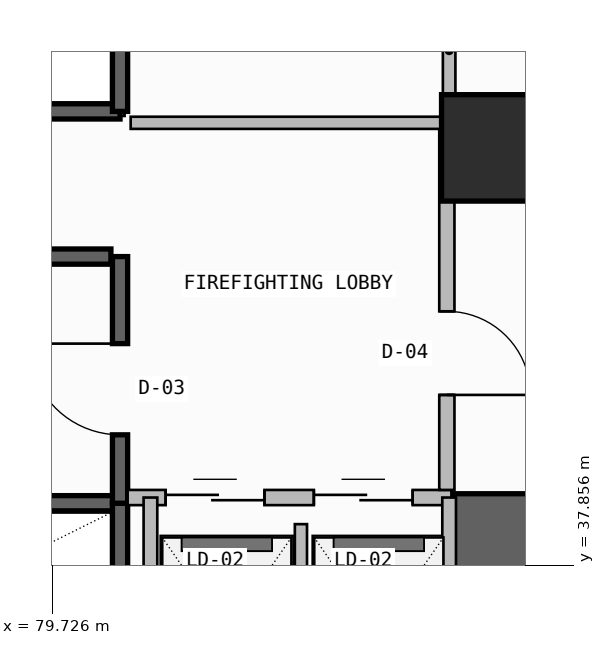
"""IFC4 building model, lengths in metres.
Left out: names, types, materials, properties, quantities, classifications, styles, units other than length and angle.
Written with IfcOpenShell. Run it as: python <this file> out.ifc"""

import sys

from ifc_helpers import new_model, si_unit, direction, frame, frame_2d, origin, origin_2d, place, context, subcontext, project, spatial, rectangle, extrude, element, fill, save


model = new_model("IFC4")
c1 = context("Model", 3, precision=1e-05, world=origin(), true_north=direction((0.0, 1.0)))
c2 = subcontext(c1, "Body", "Model", "MODEL_VIEW")
j1 = project(units=[si_unit("LENGTHUNIT", "METRE"), si_unit("PLANEANGLEUNIT", "RADIAN")], contexts=[c1])
p1 = place(None, origin())
s1 = spatial("IfcSite", under=j1, at=p1, CompositionType="ELEMENT")
p2 = place(p1, origin())
s2 = spatial("IfcBuilding", under=s1, at=p2, CompositionType="ELEMENT")
p3 = place(p2, frame((0.0, 0.0, 70.5)))
s3 = spatial("IfcBuildingStorey", under=s2, at=p3, CompositionType="ELEMENT", Elevation=70.5)
p4 = place(p3, frame((85.55, 35.5, -0.26), z_axis=(0.0, 0.0, 1.0), x_axis=(0.0, 1.0, 0.0)))
e1 = element("IfcWall", 1, at=p4, inside=s3, PredefinedType="SHEAR", context=c2, shape_type="SweptSolid", body=[
    extrude(rectangle(XDim=3.3, YDim=1.1, at=frame_2d((1.65, 0.0))), origin(), (0.0, 0.0, 1.0), 3.6),
])
p5 = place(p3, frame((85.55, 43.35, 0.0), z_axis=(0.0, 0.0, 1.0), x_axis=(1.0, 0.0, 0.0)))
e2 = element("IfcColumn", 2, at=p5, inside=s3, PredefinedType="COLUMN", context=c2, shape_type="SweptSolid", body=[
    extrude(rectangle(XDim=1.4, YDim=1.4, at=origin_2d()), origin(), (0.0, 0.0, 1.0), 3.6),
])
p6 = place(p3, frame((72.92, 38.675, -0.26), z_axis=(0.0, 0.0, 1.0), x_axis=(1.0, 0.0, 0.0)))
e3 = element("IfcWall", 3, at=p6, inside=s3, PredefinedType="SOLIDWALL", context=c2, shape_type="SweptSolid", body=[
    extrude(rectangle(XDim=7.7, YDim=0.2, at=frame_2d((3.85, 0.0))), origin(), (0.0, 0.0, 1.0), 3.6),
])
p7 = place(p3, frame((80.62, 35.52, -0.26), z_axis=(0.0, 0.0, 1.0), x_axis=(0.0, 1.0, 0.0)))
e4 = element("IfcWall", 4, at=p7, inside=s3, PredefinedType="SOLIDWALL", context=c2, shape_type="SweptSolid", body=[
    extrude(rectangle(XDim=3.155, YDim=0.2, at=frame_2d((1.578, 0.0))), origin(), (0.0, 0.0, 1.0), 3.6),
])
p8 = place(p3, frame((80.62, 38.675, -0.26), z_axis=(0.0, 0.0, 1.0), x_axis=(0.0, 1.0, 0.0)))
e5 = element("IfcWall", 5, at=p8, inside=s3, PredefinedType="SOLIDWALL", context=c2, shape_type="SweptSolid", body=[
    extrude(rectangle(XDim=3.245, YDim=0.2, at=frame_2d((1.623, 0.0))), origin(), (0.0, 0.0, 1.0), 3.6),
])
p9 = place(p8, frame((0.9, 0.0, 0.26)))
e6 = element("IfcOpeningElement", 6, at=p9, cuts=e5, PredefinedType="OPENING", context=c2, shape_type="SweptSolid", body=[
    extrude(rectangle(XDim=1.2, YDim=2.2, at=frame_2d((0.6, 1.1))), frame((0.0, 0.11, 0.0), z_axis=(0.0, -1.0, 0.0), x_axis=(1.0, 0.0, 0.0)), (0.0, 0.0, 1.0), 0.22),
])
p10 = place(p3, frame((80.72, 38.75, 0.0), z_axis=(0.0, 0.0, 1.0), x_axis=(1.0, 0.0, 0.0)))
e7 = element("IfcWall", 7, at=p10, inside=s3, PredefinedType="SOLIDWALL", context=c2, shape_type="SweptSolid", body=[
    extrude(rectangle(XDim=4.26, YDim=0.2, at=frame_2d((2.13, 0.0))), origin(), (0.0, 0.0, 1.0), 3.34),
])
p11 = place(p10, frame((0.5, 0.0, 0.0)))
e8 = element("IfcOpeningElement", 8, at=p11, cuts=e7, PredefinedType="OPENING", context=c2, shape_type="SweptSolid", body=[
    extrude(rectangle(XDim=1.3, YDim=2.3, at=frame_2d((0.65, 1.15))), frame((0.0, 0.11, 0.0), z_axis=(0.0, -1.0, 0.0), x_axis=(1.0, 0.0, 0.0)), (0.0, 0.0, 1.0), 0.22),
])
p12 = place(p10, frame((2.45, 0.0, 0.0)))
e9 = element("IfcOpeningElement", 9, at=p12, cuts=e7, PredefinedType="OPENING", context=c2, shape_type="SweptSolid", body=[
    extrude(rectangle(XDim=1.3, YDim=2.3, at=frame_2d((0.65, 1.15))), frame((0.0, 0.11, 0.0), z_axis=(0.0, -1.0, 0.0), x_axis=(1.0, 0.0, 0.0)), (0.0, 0.0, 1.0), 0.22),
])
p13 = place(p3, frame((83.0, 35.65, 0.0), z_axis=(0.0, 0.0, 1.0), x_axis=(0.0, 1.0, 0.0)))
e10 = element("IfcWall", 10, at=p13, inside=s3, PredefinedType="PLUMBINGWALL", context=c2, shape_type="SweptSolid", body=[
    extrude(rectangle(XDim=2.75, YDim=0.16, at=frame_2d((1.375, 0.0))), origin(), (0.0, 0.0, 1.0), 3.34),
])
for number, where, z_axis, x_axis in (
    (11, (84.95, 35.65, 0.0), (0.0, 0.0, 1.0), (0.0, 1.0, 0.0)),
    (12, (81.02, 35.65, 0.0), (0.0, 0.0, 1.0), (0.0, 1.0, 0.0)),
):
    element("IfcWall", number, at=place(p3, frame(where, z_axis=z_axis, x_axis=x_axis)), inside=s3, PredefinedType="SOLIDWALL", context=c2, shape_type="SweptSolid", body=[
        extrude(rectangle(XDim=3.1, YDim=0.18, at=frame_2d((1.55, 0.0))), origin(), (0.0, 0.0, 1.0), 3.34),
    ])
p14 = place(p3, frame((84.92, 38.85, 0.0), z_axis=(0.0, 0.0, 1.0), x_axis=(0.0, 1.0, 0.0)))
e13 = element("IfcWall", 13, at=p14, inside=s3, PredefinedType="SOLIDWALL", context=c2, shape_type="SweptSolid", body=[
    extrude(rectangle(XDim=4.83, YDim=0.2, at=frame_2d((2.415, 0.0))), origin(), (0.0, 0.0, 1.0), 3.34),
])
p15 = place(p14, frame((1.25, 0.0, 0.0)))
e14 = element("IfcOpeningElement", 14, at=p15, cuts=e13, PredefinedType="OPENING", context=c2, shape_type="SweptSolid", body=[
    extrude(rectangle(XDim=1.1, YDim=2.2, at=frame_2d((0.55, 1.1))), frame((0.0, 0.11, 0.0), z_axis=(0.0, -1.0, 0.0), x_axis=(1.0, 0.0, 0.0)), (0.0, 0.0, 1.0), 0.22),
])
p16 = place(p3, frame((72.92, 41.92, -0.26), z_axis=(0.0, 0.0, 1.0), x_axis=(1.0, 0.0, 0.0)))
e15 = element("IfcWall", 15, at=p16, inside=s3, PredefinedType="SOLIDWALL", context=c2, shape_type="SweptSolid", body=[
    extrude(rectangle(XDim=7.58, YDim=0.2, at=frame_2d((3.79, 0.0))), origin(), (0.0, 0.0, 1.0), 3.6),
])
p17 = place(p3, frame((72.92, 43.83, -0.26), z_axis=(0.0, 0.0, 1.0), x_axis=(1.0, 0.0, 0.0)))
e16 = element("IfcWall", 16, at=p17, inside=s3, PredefinedType="SOLIDWALL", context=c2, shape_type="SweptSolid", body=[
    extrude(rectangle(XDim=7.7, YDim=0.2, at=frame_2d((3.85, 0.0))), origin(), (0.0, 0.0, 1.0), 3.6),
])
p18 = place(p3, frame((80.62, 43.83, -0.26), z_axis=(0.0, 0.0, 1.0), x_axis=(0.0, 1.0, 0.0)))
e17 = element("IfcWall", 17, at=p18, inside=s3, PredefinedType="SOLIDWALL", context=c2, shape_type="SweptSolid", body=[
    extrude(rectangle(XDim=3.24, YDim=0.2, at=frame_2d((1.62, 0.0))), origin(), (0.0, 0.0, 1.0), 3.6),
])
p19 = place(p3, frame((84.95, 43.68, 0.0), z_axis=(0.0, 0.0, 1.0), x_axis=(0.0, 1.0, 0.0)))
e18 = element("IfcWall", 18, at=p19, inside=s3, PredefinedType="PLUMBINGWALL", context=c2, shape_type="SweptSolid", body=[
    extrude(rectangle(XDim=1.9, YDim=0.165, at=frame_2d((0.95, 0.0))), origin(), (0.0, 0.0, 1.0), 3.34),
])
p20 = place(p3, frame((80.76, 43.68, 0.0), z_axis=(0.0, 0.0, 1.0), x_axis=(1.0, 0.0, 0.0)))
e19 = element("IfcWall", 19, at=p20, inside=s3, PredefinedType="PLUMBINGWALL", context=c2, shape_type="SweptSolid", body=[
    extrude(rectangle(XDim=4.19, YDim=0.16, at=frame_2d((2.095, 0.0))), origin(), (0.0, 0.0, 1.0), 3.34),
])
p21 = place(p9, origin())
e20 = element("IfcDoor", 20, at=p21, inside=s3, OperationType="SINGLE_SWING_RIGHT", PredefinedType="USERDEFINED", context=c2, shape_type="SweptSolid", body=[
    extrude(rectangle(XDim=1.2, YDim=2.2, at=frame_2d((0.6, 1.1))), frame((0.0, 0.025, 0.0), z_axis=(0.0, -1.0, 0.0), x_axis=(1.0, 0.0, 0.0)), (0.0, 0.0, 1.0), 0.05),
])
fill(e6, e20)
p22 = place(p11, origin())
e21 = element("IfcDoor", 21, at=p22, inside=s3, OperationType="DOUBLE_DOOR_SLIDING", PredefinedType="DOOR", context=c2, shape_type="SweptSolid", body=[
    extrude(rectangle(XDim=1.3, YDim=2.3, at=frame_2d((0.65, 1.15))), frame((0.0, 0.025, 0.0), z_axis=(0.0, -1.0, 0.0), x_axis=(1.0, 0.0, 0.0)), (0.0, 0.0, 1.0), 0.05),
])
fill(e8, e21)
p23 = place(p12, origin())
e22 = element("IfcDoor", 22, at=p23, inside=s3, OperationType="DOUBLE_DOOR_SLIDING", PredefinedType="DOOR", context=c2, shape_type="SweptSolid", body=[
    extrude(rectangle(XDim=1.3, YDim=2.3, at=frame_2d((0.65, 1.15))), frame((0.0, 0.025, 0.0), z_axis=(0.0, -1.0, 0.0), x_axis=(1.0, 0.0, 0.0)), (0.0, 0.0, 1.0), 0.05),
])
fill(e9, e22)
p24 = place(p15, frame((1.1, 0.0, 0.0), z_axis=(0.0, 0.0, 1.0), x_axis=(-1.0, 0.0, 0.0)))
e23 = element("IfcDoor", 23, at=p24, inside=s3, OperationType="SINGLE_SWING_RIGHT", PredefinedType="DOOR", context=c2, shape_type="SweptSolid", body=[
    extrude(rectangle(XDim=1.1, YDim=2.2, at=frame_2d((0.55, 1.1))), frame((0.0, 0.025, 0.0), z_axis=(0.0, -1.0, 0.0), x_axis=(1.0, 0.0, 0.0)), (0.0, 0.0, 1.0), 0.05),
])
fill(e14, e23)
save(model, sys.argv[1])
